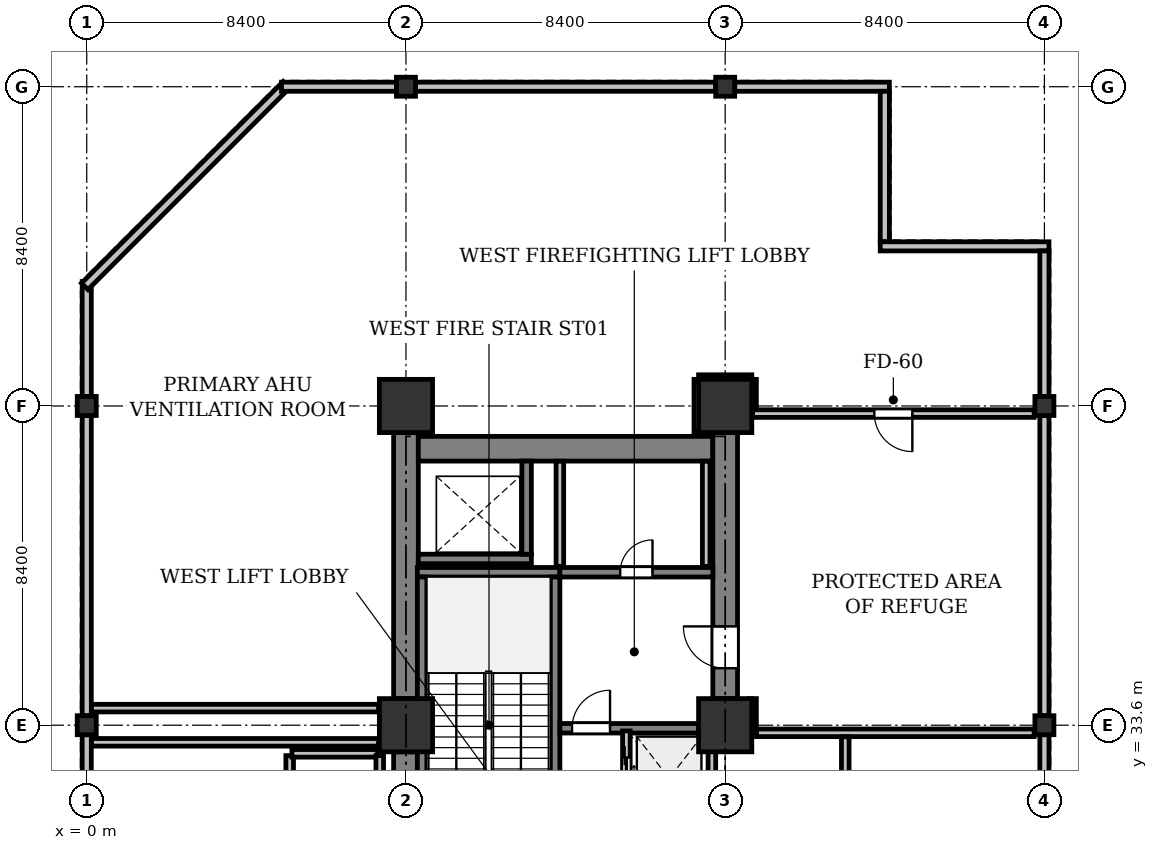
"""IFC4 building model, lengths in metres.
Left out: names, types, materials, properties, quantities, classifications, styles, units other than length and angle.
Written with IfcOpenShell. Run it as: python <this file> out.ifc"""

import sys

from ifc_helpers import new_model, si_unit, direction, frame, frame_2d, origin, origin_2d, place, context, subcontext, project, spatial, rectangle, i_section, extrude, element, fill, save


model = new_model("IFC4")
c1 = context("Model", 3, precision=1e-05, world=origin(), true_north=direction((0.0, 1.0)))
c2 = subcontext(c1, "Body", "Model", "MODEL_VIEW")
j1 = project(units=[si_unit("LENGTHUNIT", "METRE"), si_unit("PLANEANGLEUNIT", "RADIAN")], contexts=[c1])
p1 = place(None, origin())
s1 = spatial("IfcSite", under=j1, at=p1, CompositionType="ELEMENT")
p2 = place(p1, origin())
s2 = spatial("IfcBuilding", under=s1, at=p2, CompositionType="ELEMENT")
p3 = place(p2, frame((0.0, 0.0, 79.4)))
s3 = spatial("IfcBuildingStorey", under=s2, at=p3, CompositionType="ELEMENT", Elevation=79.4)
for number, where, z_axis, x_axis in (
    (1, (0.0, 33.6, 0.0), (0.0, 0.0, 1.0), (1.0, 0.0, 0.0)),
    (2, (0.0, 42.0, 0.0), (0.0, 0.0, 1.0), (1.0, 0.0, 0.0)),
):
    element("IfcColumn", number, at=place(p3, frame(where, z_axis=z_axis, x_axis=x_axis)), inside=s3, PredefinedType="COLUMN", context=c2, shape_type="SweptSolid", body=[
        extrude(i_section(OverallWidth=0.5, OverallDepth=0.5, WebThickness=0.028, FlangeThickness=0.04, at=origin_2d()), origin(), (0.0, 0.0, 1.0), 5.0),
    ])
for number, where, z_axis, x_axis in (
    (3, (8.4, 33.6, 0.0), (0.0, 0.0, 1.0), (1.0, 0.0, 0.0)),
    (4, (8.4, 42.0, 0.0), (0.0, 0.0, 1.0), (1.0, 0.0, 0.0)),
):
    element("IfcColumn", number, at=place(p3, frame(where, z_axis=z_axis, x_axis=x_axis)), inside=s3, PredefinedType="COLUMN", context=c2, shape_type="SweptSolid", body=[
        extrude(rectangle(XDim=1.4, YDim=1.4, at=origin_2d()), origin(), (0.0, 0.0, 1.0), 5.0),
    ])
p4 = place(p3, frame((8.4, 50.4, 0.0), z_axis=(0.0, 0.0, 1.0), x_axis=(1.0, 0.0, 0.0)))
e5 = element("IfcColumn", 5, at=p4, inside=s3, PredefinedType="COLUMN", context=c2, shape_type="SweptSolid", body=[
    extrude(i_section(OverallWidth=0.5, OverallDepth=0.5, WebThickness=0.028, FlangeThickness=0.04, at=origin_2d()), origin(), (0.0, 0.0, 1.0), 5.0),
])
for number, where, z_axis, x_axis in (
    (6, (16.8, 33.6, 0.0), (0.0, 0.0, 1.0), (1.0, 0.0, 0.0)),
    (7, (16.8, 42.0, 0.0), (0.0, 0.0, 1.0), (1.0, 0.0, 0.0)),
):
    element("IfcColumn", number, at=place(p3, frame(where, z_axis=z_axis, x_axis=x_axis)), inside=s3, PredefinedType="COLUMN", context=c2, shape_type="SweptSolid", body=[
        extrude(rectangle(XDim=1.4, YDim=1.4, at=origin_2d()), origin(), (0.0, 0.0, 1.0), 5.0),
    ])
for number, where, z_axis, x_axis in (
    (8, (16.8, 50.4, 0.0), (0.0, 0.0, 1.0), (1.0, 0.0, 0.0)),
    (9, (25.2, 33.6, 0.0), (0.0, 0.0, 1.0), (1.0, 0.0, 0.0)),
    (10, (25.2, 42.0, 0.0), (0.0, 0.0, 1.0), (1.0, 0.0, 0.0)),
):
    element("IfcColumn", number, at=place(p3, frame(where, z_axis=z_axis, x_axis=x_axis)), inside=s3, PredefinedType="COLUMN", context=c2, shape_type="SweptSolid", body=[
        extrude(i_section(OverallWidth=0.5, OverallDepth=0.5, WebThickness=0.028, FlangeThickness=0.04, at=origin_2d()), origin(), (0.0, 0.0, 1.0), 5.0),
    ])
p5 = place(p3, frame((0.0, 25.45, 0.0), z_axis=(0.0, 0.0, 1.0), x_axis=(0.0, 1.0, 0.0)))
e11 = element("IfcWall", 11, at=p5, inside=s3, PredefinedType="STANDARD", context=c2, shape_type="SweptSolid", body=[
    extrude(rectangle(XDim=7.9, YDim=0.24, at=frame_2d((3.95, 0.0))), origin(), (0.0, 0.0, 1.0), 4.425),
])
p6 = place(p3, frame((0.0, 33.85, 0.0), z_axis=(0.0, 0.0, 1.0), x_axis=(0.0, 1.0, 0.0)))
e12 = element("IfcWall", 12, at=p6, inside=s3, PredefinedType="STANDARD", context=c2, shape_type="SweptSolid", body=[
    extrude(rectangle(XDim=7.9, YDim=0.24, at=frame_2d((3.95, 0.0))), origin(), (0.0, 0.0, 1.0), 4.425),
])
p7 = place(p3, frame((0.0, 42.25, 0.0), z_axis=(0.0, 0.0, 1.0), x_axis=(0.0, 1.0, 0.0)))
e13 = element("IfcWall", 13, at=p7, inside=s3, PredefinedType="STANDARD", context=c2, shape_type="SweptSolid", body=[
    extrude(rectangle(XDim=3.025, YDim=0.24, at=frame_2d((1.512, 0.0))), origin(), (0.0, 0.0, 1.0), 4.725),
])
p8 = place(p3, frame((-0.053, 45.147, 0.0), z_axis=(0.0, 0.0, 1.0), x_axis=(0.707090511833, 0.707123050166, 0.0)))
e14 = element("IfcWall", 14, at=p8, inside=s3, PredefinedType="STANDARD", context=c2, shape_type="SweptSolid", body=[
    extrude(rectangle(XDim=7.503, YDim=0.24, at=frame_2d((3.751, 0.0))), origin(), (0.0, 0.0, 1.0), 4.725),
])
p9 = place(p3, frame((5.125, 50.4, 0.0), z_axis=(0.0, 0.0, 1.0), x_axis=(1.0, 0.0, 0.0)))
e15 = element("IfcWall", 15, at=p9, inside=s3, PredefinedType="STANDARD", context=c2, shape_type="SweptSolid", body=[
    extrude(rectangle(XDim=3.025, YDim=0.24, at=frame_2d((1.512, 0.0))), origin(), (0.0, 0.0, 1.0), 4.725),
])
p10 = place(p3, frame((8.65, 50.4, 0.0), z_axis=(0.0, 0.0, 1.0), x_axis=(1.0, 0.0, 0.0)))
e16 = element("IfcWall", 16, at=p10, inside=s3, PredefinedType="STANDARD", context=c2, shape_type="SweptSolid", body=[
    extrude(rectangle(XDim=7.9, YDim=0.24, at=frame_2d((3.95, 0.0))), origin(), (0.0, 0.0, 1.0), 4.425),
])
p11 = place(p3, frame((17.05, 50.4, 0.0), z_axis=(0.0, 0.0, 1.0), x_axis=(1.0, 0.0, 0.0)))
e17 = element("IfcWall", 17, at=p11, inside=s3, PredefinedType="STANDARD", context=c2, shape_type="SweptSolid", body=[
    extrude(rectangle(XDim=4.07, YDim=0.24, at=frame_2d((2.035, 0.0))), origin(), (0.0, 0.0, 1.0), 4.725),
])
p12 = place(p3, frame((21.0, 50.28, 0.0), z_axis=(0.0, 0.0, 1.0), x_axis=(0.0, -1.0, 0.0)))
e18 = element("IfcWall", 18, at=p12, inside=s3, PredefinedType="STANDARD", context=c2, shape_type="SweptSolid", body=[
    extrude(rectangle(XDim=3.96, YDim=0.24, at=frame_2d((1.98, 0.0))), origin(), (0.0, 0.0, 1.0), 4.725),
])
p13 = place(p3, frame((20.88, 46.2, 0.0), z_axis=(0.0, 0.0, 1.0), x_axis=(1.0, 0.0, 0.0)))
e19 = element("IfcWall", 19, at=p13, inside=s3, PredefinedType="STANDARD", context=c2, shape_type="SweptSolid", body=[
    extrude(rectangle(XDim=4.44, YDim=0.24, at=frame_2d((2.22, 0.0))), origin(), (0.0, 0.0, 1.0), 4.725),
])
p14 = place(p3, frame((25.2, 46.08, 0.0), z_axis=(0.0, 0.0, 1.0), x_axis=(0.0, -1.0, 0.0)))
e20 = element("IfcWall", 20, at=p14, inside=s3, PredefinedType="STANDARD", context=c2, shape_type="SweptSolid", body=[
    extrude(rectangle(XDim=3.83, YDim=0.24, at=frame_2d((1.915, 0.0))), origin(), (0.0, 0.0, 1.0), 4.725),
])
p15 = place(p3, frame((25.2, 41.75, 0.0), z_axis=(0.0, 0.0, 1.0), x_axis=(0.0, -1.0, 0.0)))
e21 = element("IfcWall", 21, at=p15, inside=s3, PredefinedType="STANDARD", context=c2, shape_type="SweptSolid", body=[
    extrude(rectangle(XDim=7.9, YDim=0.24, at=frame_2d((3.95, 0.0))), origin(), (0.0, 0.0, 1.0), 3.709),
])
p16 = place(p3, frame((25.2, 33.35, 0.0), z_axis=(0.0, 0.0, 1.0), x_axis=(0.0, -1.0, 0.0)))
e22 = element("IfcWall", 22, at=p16, inside=s3, PredefinedType="STANDARD", context=c2, shape_type="SweptSolid", body=[
    extrude(rectangle(XDim=7.9, YDim=0.24, at=frame_2d((3.95, 0.0))), origin(), (0.0, 0.0, 1.0), 3.709),
])
for number, where, z_axis, x_axis in (
    (23, (8.4, 25.9, 0.0), (0.0, 0.0, 1.0), (0.0, 1.0, 0.0)),
    (24, (8.4, 34.3, 0.0), (0.0, 0.0, 1.0), (0.0, 1.0, 0.0)),
):
    element("IfcWall", number, at=place(p3, frame(where, z_axis=z_axis, x_axis=x_axis)), inside=s3, PredefinedType="SHEAR", context=c2, shape_type="SweptSolid", body=[
        extrude(rectangle(XDim=7.0, YDim=0.65, at=frame_2d((3.5, 0.0))), origin(), (0.0, 0.0, 1.0), 4.725),
    ])
p17 = place(p3, frame((8.725, 40.875, 0.0), z_axis=(0.0, 0.0, 1.0), x_axis=(1.0, 0.0, 0.0)))
e25 = element("IfcWall", 25, at=p17, inside=s3, PredefinedType="SHEAR", context=c2, shape_type="SweptSolid", body=[
    extrude(rectangle(XDim=7.75, YDim=0.65, at=frame_2d((3.875, 0.0))), origin(), (0.0, 0.0, 1.0), 4.725),
])
p18 = place(p3, frame((16.8, 34.3, 0.0), z_axis=(0.0, 0.0, 1.0), x_axis=(0.0, 1.0, 0.0)))
e26 = element("IfcWall", 26, at=p18, inside=s3, PredefinedType="SHEAR", context=c2, shape_type="SweptSolid", body=[
    extrude(rectangle(XDim=7.0, YDim=0.65, at=frame_2d((3.5, 0.0))), origin(), (0.0, 0.0, 1.0), 4.725),
])
p19 = place(p18, frame((0.8, 0.0, 0.0)))
e27 = element("IfcOpeningElement", 27, at=p19, cuts=e26, PredefinedType="OPENING", context=c2, shape_type="SweptSolid", body=[
    extrude(rectangle(XDim=1.1, YDim=2.15, at=frame_2d((0.55, 1.075))), frame((0.0, 0.335, 0.0), z_axis=(0.0, -1.0, 0.0), x_axis=(1.0, 0.0, 0.0)), (0.0, 0.0, 1.0), 0.67),
])
p20 = place(p3, frame((12.45, 37.625, 0.0), z_axis=(0.0, 0.0, 1.0), x_axis=(-1.0, 0.0, 0.0)))
e28 = element("IfcWall", 28, at=p20, inside=s3, PredefinedType="SHEAR", context=c2, shape_type="SweptSolid", body=[
    extrude(rectangle(XDim=3.75, YDim=0.25, at=frame_2d((1.875, 0.0))), origin(), (0.0, 0.0, 1.0), 4.725),
])
p21 = place(p3, frame((12.325, 29.75, 0.0), z_axis=(0.0, 0.0, 1.0), x_axis=(0.0, 1.0, 0.0)))
e29 = element("IfcWall", 29, at=p21, inside=s3, PredefinedType="SHEAR", context=c2, shape_type="SweptSolid", body=[
    extrude(rectangle(XDim=7.75, YDim=0.25, at=frame_2d((3.875, 0.0))), origin(), (0.0, 0.0, 1.0), 4.725),
])
p22 = place(p21, frame((0.22, 0.0, 0.0)))
e30 = element("IfcOpeningElement", 30, at=p22, cuts=e29, PredefinedType="OPENING", context=c2, shape_type="SweptSolid", body=[
    extrude(rectangle(XDim=1.1, YDim=2.15, at=frame_2d((0.55, 1.075))), frame((0.0, 0.135, 0.0), z_axis=(0.0, -1.0, 0.0), x_axis=(1.0, 0.0, 0.0)), (0.0, 0.0, 1.0), 0.27),
])
p23 = place(p3, frame((8.825, 29.75, 0.0), z_axis=(0.0, 0.0, 1.0), x_axis=(0.0, 1.0, 0.0)))
e31 = element("IfcWall", 31, at=p23, inside=s3, PredefinedType="SHEAR", context=c2, shape_type="SweptSolid", body=[
    extrude(rectangle(XDim=7.75, YDim=0.25, at=frame_2d((3.875, 0.0))), origin(), (0.0, 0.0, 1.0), 4.725),
])
p24 = place(p3, frame((8.725, 37.975, 0.0), z_axis=(0.0, 0.0, 1.0), x_axis=(1.0, 0.0, 0.0)))
e32 = element("IfcWall", 32, at=p24, inside=s3, PredefinedType="SHEAR", context=c2, shape_type="SweptSolid", body=[
    extrude(rectangle(XDim=2.975, YDim=0.25, at=frame_2d((1.487, 0.0))), origin(), (0.0, 0.0, 1.0), 4.725),
])
p25 = place(p3, frame((11.575, 38.1, 0.0), z_axis=(0.0, 0.0, 1.0), x_axis=(0.0, 1.0, 0.0)))
e33 = element("IfcWall", 33, at=p25, inside=s3, PredefinedType="SHEAR", context=c2, shape_type="SweptSolid", body=[
    extrude(rectangle(XDim=2.45, YDim=0.25, at=frame_2d((1.225, 0.0))), origin(), (0.0, 0.0, 1.0), 4.725),
])
p26 = place(p3, frame((12.45, 33.52, 0.0), z_axis=(0.0, 0.0, 1.0), x_axis=(1.0, 0.0, 0.0)))
e34 = element("IfcWall", 34, at=p26, inside=s3, PredefinedType="SHEAR", context=c2, shape_type="SweptSolid", body=[
    extrude(rectangle(XDim=3.65, YDim=0.25, at=frame_2d((1.825, 0.0))), origin(), (0.0, 0.0, 1.0), 4.725),
])
p27 = place(p26, frame((0.32, 0.0, 0.0)))
e35 = element("IfcOpeningElement", 35, at=p27, cuts=e34, PredefinedType="OPENING", context=c2, shape_type="SweptSolid", body=[
    extrude(rectangle(XDim=1.0, YDim=2.15, at=frame_2d((0.5, 1.075))), frame((0.0, 0.135, 0.0), z_axis=(0.0, -1.0, 0.0), x_axis=(1.0, 0.0, 0.0)), (0.0, 0.0, 1.0), 0.27),
])
p28 = place(p3, frame((12.45, 37.625, 0.0), z_axis=(0.0, 0.0, 1.0), x_axis=(1.0, 0.0, 0.0)))
e36 = element("IfcWall", 36, at=p28, inside=s3, PredefinedType="SHEAR", context=c2, shape_type="SweptSolid", body=[
    extrude(rectangle(XDim=4.025, YDim=0.25, at=frame_2d((2.013, 0.0))), origin(), (0.0, 0.0, 1.0), 4.725),
])
p29 = place(p28, frame((1.587, 0.0, 0.0)))
e37 = element("IfcOpeningElement", 37, at=p29, cuts=e36, PredefinedType="OPENING", context=c2, shape_type="SweptSolid", body=[
    extrude(rectangle(XDim=0.85, YDim=2.15, at=frame_2d((0.425, 1.075))), frame((0.0, 0.135, 0.0), z_axis=(0.0, -1.0, 0.0), x_axis=(1.0, 0.0, 0.0)), (0.0, 0.0, 1.0), 0.27),
])
p30 = place(p3, frame((14.2, 30.95, 0.0), z_axis=(0.0, 0.0, 1.0), x_axis=(0.0, 1.0, 0.0)))
e38 = element("IfcWall", 38, at=p30, inside=s3, PredefinedType="PARTITIONING", context=c2, shape_type="SweptSolid", body=[
    extrude(rectangle(XDim=2.5, YDim=0.2, at=frame_2d((1.25, 0.0))), origin(), (0.0, 0.0, 1.0), 4.725),
])
p31 = place(p30, frame((0.7, 0.0, 0.0)))
e39 = element("IfcOpeningElement", 39, at=p31, cuts=e38, PredefinedType="OPENING", context=c2, shape_type="SweptSolid", body=[
    extrude(rectangle(XDim=1.1, YDim=2.2, at=frame_2d((0.55, 1.1))), frame((0.0, 0.11, 0.0), z_axis=(0.0, -1.0, 0.0), x_axis=(1.0, 0.0, 0.0)), (0.0, 0.0, 1.0), 0.22),
])
p32 = place(p3, frame((16.45, 31.05, 0.0), z_axis=(0.0, 0.0, 1.0), x_axis=(0.0, 1.0, 0.0)))
e40 = element("IfcWall", 40, at=p32, inside=s3, PredefinedType="PARTITIONING", context=c2, shape_type="SweptSolid", body=[
    extrude(rectangle(XDim=2.3, YDim=0.2, at=frame_2d((1.15, 0.0))), origin(), (0.0, 0.0, 1.0), 4.725),
])
for number, where, z_axis, x_axis in (
    (41, (16.3, 37.78, 0.0), (0.0, 0.0, 1.0), (0.0, 1.0, 0.0)),
    (42, (12.45, 40.546, 0.0), (0.0, 0.0, 1.0), (0.0, -1.0, 0.0)),
):
    element("IfcWall", number, at=place(p3, frame(where, z_axis=z_axis, x_axis=x_axis)), inside=s3, PredefinedType="PARTITIONING", context=c2, shape_type="SweptSolid", body=[
        extrude(rectangle(XDim=2.766, YDim=0.2, at=frame_2d((1.383, 0.0))), origin(), (0.0, 0.0, 1.0), 3.625),
    ])
p33 = place(p3, frame((17.52, 34.3, 0.0), z_axis=(0.0, 0.0, 1.0), x_axis=(0.0, -1.0, 0.0)))
e43 = element("IfcWall", 43, at=p33, inside=s3, PredefinedType="PARTITIONING", context=c2, shape_type="SweptSolid", body=[
    extrude(rectangle(XDim=0.9, YDim=0.2, at=frame_2d((0.45, 0.0))), origin(), (0.0, 0.0, 1.0), 3.825),
])
p34 = place(p3, frame((17.624, 33.4, 0.0), z_axis=(0.0, 0.0, 1.0), x_axis=(1.0, 0.0, 0.0)))
e44 = element("IfcWall", 44, at=p34, inside=s3, PredefinedType="PARTITIONING", context=c2, shape_type="SweptSolid", body=[
    extrude(rectangle(XDim=7.306, YDim=0.2, at=frame_2d((3.653, 0.0))), origin(), (0.0, 0.0, 1.0), 3.825),
])
p35 = place(p3, frame((24.93, 41.8, 0.0), z_axis=(0.0, 0.0, 1.0), x_axis=(-1.0, 0.0, 0.0)))
e45 = element("IfcWall", 45, at=p35, inside=s3, PredefinedType="PARTITIONING", context=c2, shape_type="SweptSolid", body=[
    extrude(rectangle(XDim=7.41, YDim=0.2, at=frame_2d((3.705, 0.0))), origin(), (0.0, 0.0, 1.0), 3.825),
])
p36 = place(p35, frame((3.205, 0.0, 0.0)))
e46 = element("IfcOpeningElement", 46, at=p36, cuts=e45, PredefinedType="OPENING", context=c2, shape_type="SweptSolid", body=[
    extrude(rectangle(XDim=1.0, YDim=2.15, at=frame_2d((0.5, 1.075))), frame((0.0, 0.11, 0.0), z_axis=(0.0, -1.0, 0.0), x_axis=(1.0, 0.0, 0.0)), (0.0, 0.0, 1.0), 0.22),
])
p37 = place(p3, frame((5.34, 17.6, 0.0), z_axis=(0.0, 0.0, 1.0), x_axis=(0.0, 1.0, 0.0)))
e47 = element("IfcWall", 47, at=p37, inside=s3, PredefinedType="PARTITIONING", context=c2, shape_type="SweptSolid", body=[
    extrude(rectangle(XDim=15.2, YDim=0.2, at=frame_2d((7.6, 0.0))), origin(), (0.0, 0.0, 1.0), 3.825),
])
p38 = place(p37, frame((7.1, 0.0, 0.0)))
e48 = element("IfcOpeningElement", 48, at=p38, cuts=e47, PredefinedType="OPENING", context=c2, shape_type="SweptSolid", body=[
    extrude(rectangle(XDim=1.0, YDim=2.15, at=frame_2d((0.5, 1.075))), frame((0.0, 0.11, 0.0), z_axis=(0.0, -1.0, 0.0), x_axis=(1.0, 0.0, 0.0)), (0.0, 0.0, 1.0), 0.22),
])
p39 = place(p3, frame((5.4, 32.86, 0.0), z_axis=(0.0, 0.0, 1.0), x_axis=(1.0, 0.0, 0.0)))
e49 = element("IfcWall", 49, at=p39, inside=s3, PredefinedType="PARTITIONING", context=c2, shape_type="SweptSolid", body=[
    extrude(rectangle(XDim=2.25, YDim=0.2, at=frame_2d((1.125, 0.0))), origin(), (0.0, 0.0, 1.0), 4.725),
])
p40 = place(p3, frame((7.71, 32.8, 0.0), z_axis=(0.0, 0.0, 1.0), x_axis=(0.0, -1.0, 0.0)))
e50 = element("IfcWall", 50, at=p40, inside=s3, PredefinedType="PARTITIONING", context=c2, shape_type="SweptSolid", body=[
    extrude(rectangle(XDim=6.88, YDim=0.2, at=frame_2d((3.44, 0.0))), origin(), (0.0, 0.0, 1.0), 4.725),
])
for number, where, z_axis, x_axis in (
    (51, (7.68, 33.15, 0.0), (0.0, 0.0, 1.0), (-1.0, 0.0, 0.0)),
    (52, (0.124, 34.05, 0.0), (0.0, 0.0, 1.0), (1.0, 0.0, 0.0)),
):
    element("IfcWall", number, at=place(p3, frame(where, z_axis=z_axis, x_axis=x_axis)), inside=s3, PredefinedType="PARTITIONING", context=c2, shape_type="SweptSolid", body=[
        extrude(rectangle(XDim=7.556, YDim=0.2, at=frame_2d((3.778, 0.0))), origin(), (0.0, 0.0, 1.0), 4.322),
    ])
p41 = place(p3, frame((16.08, 41.3, 0.0), z_axis=(0.0, 0.0, 1.0), x_axis=(0.0, 1.0, 0.0)))
e53 = element("IfcWall", 53, at=p41, inside=s3, PredefinedType="PARTITIONING", context=c2, shape_type="SweptSolid", body=[
    extrude(rectangle(XDim=1.4, YDim=0.2, at=frame_2d((0.7, 0.0))), origin(), (0.0, 0.0, 1.0), 3.825),
])
p42 = place(p3, frame((16.1, 42.72, 0.0), z_axis=(0.0, 0.0, 1.0), x_axis=(1.0, 0.0, 0.0)))
e54 = element("IfcWall", 54, at=p42, inside=s3, PredefinedType="PARTITIONING", context=c2, shape_type="SweptSolid", body=[
    extrude(rectangle(XDim=1.4, YDim=0.2, at=frame_2d((0.7, 0.0))), origin(), (0.0, 0.0, 1.0), 3.709),
])
p43 = place(p3, frame((17.52, 42.7, 0.0), z_axis=(0.0, 0.0, 1.0), x_axis=(0.0, -1.0, 0.0)))
e55 = element("IfcWall", 55, at=p43, inside=s3, PredefinedType="PARTITIONING", context=c2, shape_type="SweptSolid", body=[
    extrude(rectangle(XDim=0.796, YDim=0.2, at=frame_2d((0.398, 0.0))), origin(), (0.0, 0.0, 1.0), 3.825),
])
p44 = place(p3, frame((19.96, 33.296, 0.0), z_axis=(0.0, 0.0, 1.0), x_axis=(0.0, -1.0, 0.0)))
e56 = element("IfcWall", 56, at=p44, inside=s3, PredefinedType="PARTITIONING", context=c2, shape_type="SweptSolid", body=[
    extrude(rectangle(XDim=13.336, YDim=0.2, at=frame_2d((6.668, 0.0))), origin(), (0.0, 0.0, 1.0), 3.825),
])
p45 = place(p44, frame((6.168, 0.0, 0.0)))
e57 = element("IfcOpeningElement", 57, at=p45, cuts=e56, PredefinedType="OPENING", context=c2, shape_type="SweptSolid", body=[
    extrude(rectangle(XDim=1.0, YDim=2.15, at=frame_2d((0.5, 1.075))), frame((0.0, 0.11, 0.0), z_axis=(0.0, -1.0, 0.0), x_axis=(1.0, 0.0, 0.0)), (0.0, 0.0, 1.0), 0.22),
])
p46 = place(p19, origin())
e58 = element("IfcDoor", 58, at=p46, inside=s3, OperationType="SINGLE_SWING_RIGHT", PredefinedType="DOOR", context=c2, shape_type="SweptSolid", body=[
    extrude(rectangle(XDim=1.1, YDim=2.15, at=frame_2d((0.55, 1.075))), frame((0.0, 0.025, 0.0), z_axis=(0.0, -1.0, 0.0), x_axis=(1.0, 0.0, 0.0)), (0.0, 0.0, 1.0), 0.05),
])
fill(e27, e58)
p47 = place(p27, origin())
e59 = element("IfcDoor", 59, at=p47, inside=s3, OperationType="SINGLE_SWING_RIGHT", PredefinedType="DOOR", context=c2, shape_type="SweptSolid", body=[
    extrude(rectangle(XDim=1.0, YDim=2.15, at=frame_2d((0.5, 1.075))), frame((0.0, 0.025, 0.0), z_axis=(0.0, -1.0, 0.0), x_axis=(1.0, 0.0, 0.0)), (0.0, 0.0, 1.0), 0.05),
])
fill(e35, e59)
p48 = place(p31, origin())
e60 = element("IfcDoor", 60, at=p48, inside=s3, OperationType="DOUBLE_DOOR_SLIDING", PredefinedType="DOOR", context=c2, shape_type="SweptSolid", body=[
    extrude(rectangle(XDim=1.1, YDim=2.2, at=frame_2d((0.55, 1.1))), frame((0.0, 0.025, 0.0), z_axis=(0.0, -1.0, 0.0), x_axis=(1.0, 0.0, 0.0)), (0.0, 0.0, 1.0), 0.05),
])
fill(e39, e60)
p49 = place(p29, origin())
e61 = element("IfcDoor", 61, at=p49, inside=s3, OperationType="SINGLE_SWING_RIGHT", PredefinedType="DOOR", context=c2, shape_type="SweptSolid", body=[
    extrude(rectangle(XDim=0.85, YDim=2.15, at=frame_2d((0.425, 1.075))), frame((0.0, 0.025, 0.0), z_axis=(0.0, -1.0, 0.0), x_axis=(1.0, 0.0, 0.0)), (0.0, 0.0, 1.0), 0.05),
])
fill(e37, e61)
p50 = place(p36, origin())
e62 = element("IfcDoor", 62, at=p50, inside=s3, OperationType="SINGLE_SWING_LEFT", PredefinedType="DOOR", context=c2, shape_type="SweptSolid", body=[
    extrude(rectangle(XDim=1.0, YDim=2.15, at=frame_2d((0.5, 1.075))), frame((0.0, 0.025, 0.0), z_axis=(0.0, -1.0, 0.0), x_axis=(1.0, 0.0, 0.0)), (0.0, 0.0, 1.0), 0.05),
])
fill(e46, e62)
save(model, sys.argv[1])
